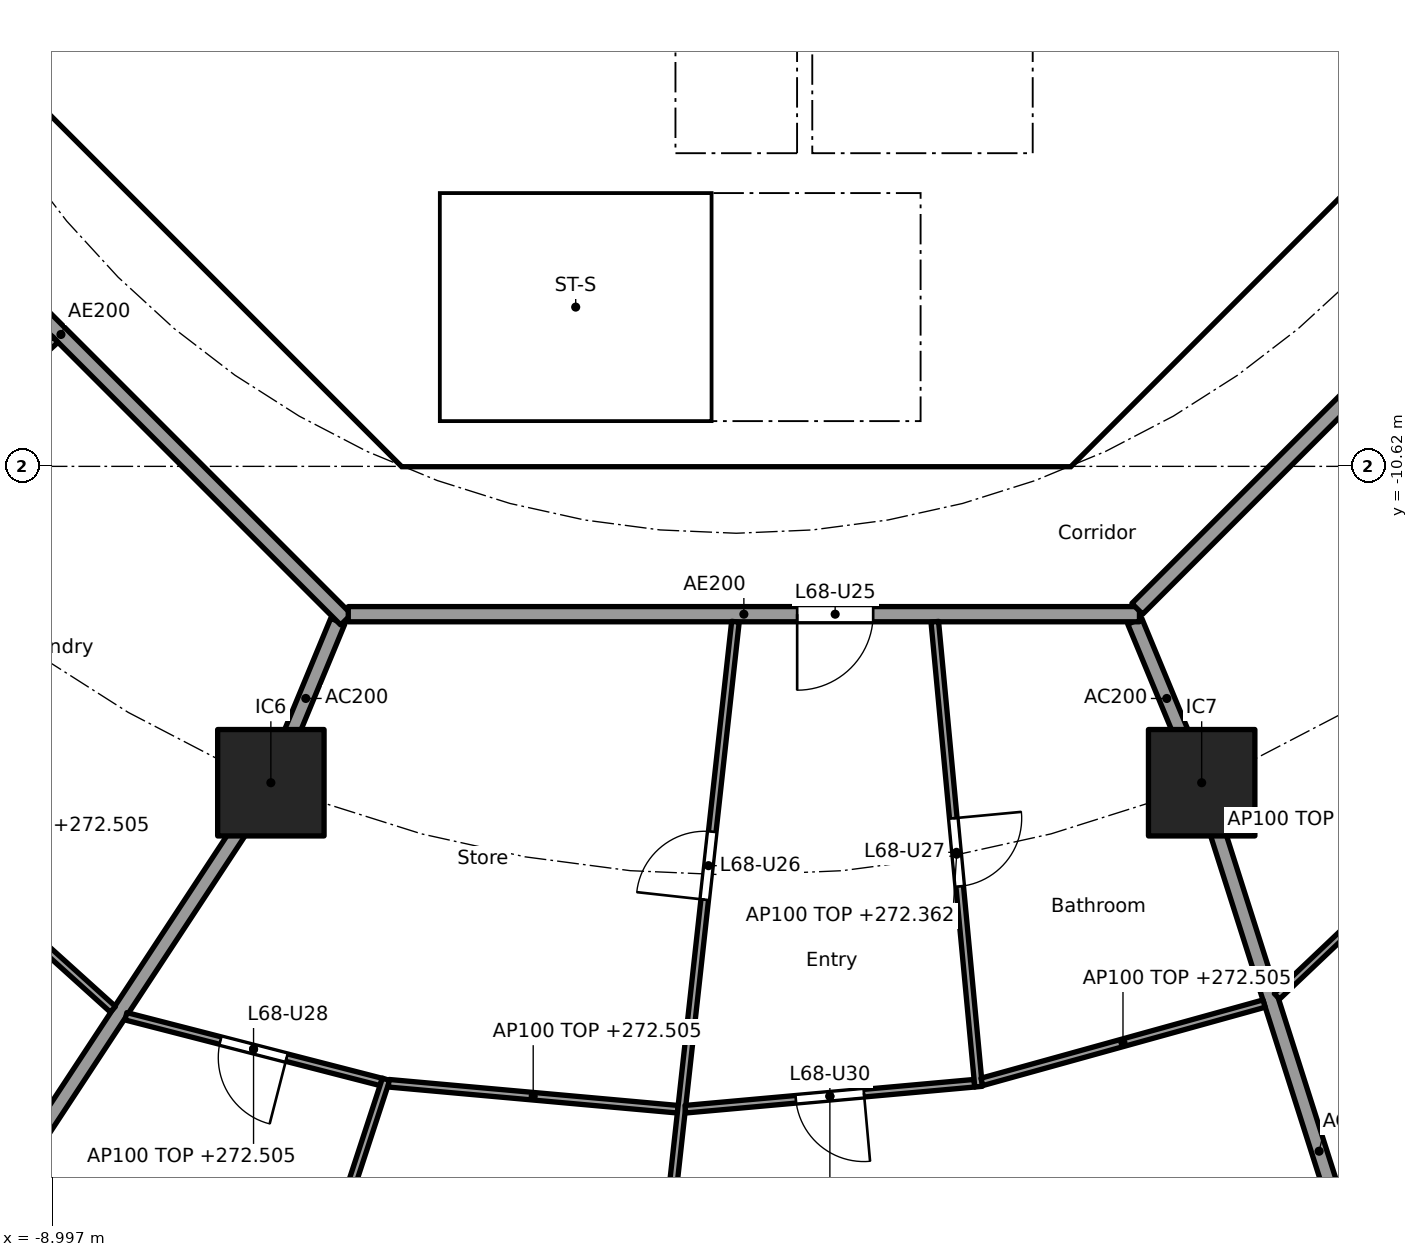
"""IFC4 building model, lengths in metres.
Left out: names, types, materials, properties, quantities, classifications, styles, units other than length and angle.
Written with IfcOpenShell. Run it as: python <this file> out.ifc"""

import sys

from ifc_helpers import new_model, si_unit, direction, frame, frame_2d, origin, origin_2d, place, context, subcontext, project, spatial, polyline, rectangle, outline, extrude, element, fill, save


model = new_model("IFC4")
c1 = context("Model", 3, precision=1e-05, world=origin(), true_north=direction((0.0, 1.0)))
c2 = subcontext(c1, "Body", "Model", "MODEL_VIEW")
j1 = project(units=[si_unit("LENGTHUNIT", "METRE"), si_unit("PLANEANGLEUNIT", "RADIAN")], contexts=[c1])
p1 = place(None, origin())
s1 = spatial("IfcSite", under=j1, at=p1, CompositionType="ELEMENT")
p2 = place(p1, origin())
s2 = spatial("IfcBuilding", under=s1, at=p2, CompositionType="ELEMENT")
p3 = place(p2, frame((0.0, 0.0, 269.6)))
s3 = spatial("IfcBuildingStorey", under=s2, at=p3, CompositionType="ELEMENT", Elevation=269.6)
for number, where, z_axis, x_axis in (
    (1, (-6.123, -14.782, 0.0), (0.0, 0.0, 1.0), (1.0, 0.0, 0.0)),
    (2, (6.123, -14.782, 0.0), (0.0, 0.0, 1.0), (1.0, 0.0, 0.0)),
):
    element("IfcColumn", number, at=place(p3, frame(where, z_axis=z_axis, x_axis=x_axis)), inside=s3, PredefinedType="COLUMN", context=c2, shape_type="SweptSolid", body=[
        extrude(rectangle(XDim=1.4, YDim=1.4, at=origin_2d()), origin(), (0.0, 0.0, 1.0), 3.7),
    ])
p4 = place(p3, frame((-9.988, -4.613, 0.0), z_axis=(0.0, 0.0, 1.0), x_axis=(0.707106781187, -0.707106781187, 0.0)))
e3 = element("IfcWall", 3, at=p4, inside=s3, PredefinedType="SHEAR", context=c2, shape_type="SweptSolid", body=[
    extrude(rectangle(XDim=7.602, YDim=0.6, at=frame_2d((3.801, 0.0))), origin(), (0.0, 0.0, 1.0), 3.44),
])
p5 = place(p4, frame((6.151, 0.0, 0.0)))
e4 = element("IfcOpeningElement", 4, at=p5, cuts=e3, PredefinedType="OPENING", context=c2, shape_type="SweptSolid", body=[
    extrude(rectangle(XDim=1.1, YDim=2.1, at=frame_2d((0.55, 1.05))), frame((0.0, 0.31, 0.0), z_axis=(0.0, -1.0, 0.0), x_axis=(1.0, 0.0, 0.0)), (0.0, 0.0, 1.0), 0.62),
])
p6 = place(p3, frame((4.613, -9.988, 0.0), z_axis=(0.0, 0.0, 1.0), x_axis=(0.707106781187, 0.707106781187, 0.0)))
e5 = element("IfcWall", 5, at=p6, inside=s3, PredefinedType="SHEAR", context=c2, shape_type="SweptSolid", body=[
    extrude(rectangle(XDim=7.602, YDim=0.6, at=frame_2d((3.801, 0.0))), origin(), (0.0, 0.0, 1.0), 3.44),
])
p7 = place(p6, frame((3.201, 0.0, 0.0)))
e6 = element("IfcOpeningElement", 6, at=p7, cuts=e5, PredefinedType="OPENING", context=c2, shape_type="SweptSolid", body=[
    extrude(rectangle(XDim=1.2, YDim=2.1, at=frame_2d((0.6, 1.05))), frame((0.0, 0.31, 0.0), z_axis=(0.0, -1.0, 0.0), x_axis=(1.0, 0.0, 0.0)), (0.0, 0.0, 1.0), 0.62),
])
p8 = place(p3, frame((4.0, -10.025, 0.0), z_axis=(0.0, 0.0, 1.0), x_axis=(0.0, 1.0, 0.0)))
e7 = element("IfcWall", 7, at=p8, inside=s3, PredefinedType="SOLIDWALL", context=c2, shape_type="SweptSolid", body=[
    extrude(rectangle(XDim=3.0, YDim=0.2, at=frame_2d((1.5, 0.0))), origin(), (0.0, 0.0, 1.0), 3.44),
])
p9 = place(p8, frame((0.975, 0.0, 0.0)))
e8 = element("IfcOpeningElement", 8, at=p9, cuts=e7, PredefinedType="OPENING", context=c2, shape_type="SweptSolid", body=[
    extrude(rectangle(XDim=1.1, YDim=2.1, at=frame_2d((0.55, 1.05))), frame((0.0, 0.11, 0.0), z_axis=(0.0, -1.0, 0.0), x_axis=(1.0, 0.0, 0.0)), (0.0, 0.0, 1.0), 0.22),
])
p10 = place(p3, frame((-5.8, -8.227, 0.0), z_axis=(0.0, 0.0, 1.0), x_axis=(0.0, 1.0, 0.0)))
e9 = element("IfcWall", 9, at=p10, inside=s3, PredefinedType="PARTITIONING", context=c2, shape_type="SweptSolid", body=[
    extrude(rectangle(XDim=3.927, YDim=0.15, at=frame_2d((1.963, 0.0))), origin(), (0.0, 0.0, 1.0), 3.44),
])
p11 = place(p10, frame((2.615, 0.0, 0.0)))
e10 = element("IfcOpeningElement", 10, at=p11, cuts=e9, PredefinedType="OPENING", context=c2, shape_type="SweptSolid", body=[
    extrude(rectangle(XDim=0.9, YDim=2.1, at=frame_2d((0.45, 1.05))), frame((0.0, 0.085, 0.0), z_axis=(0.0, -1.0, 0.0), x_axis=(1.0, 0.0, 0.0)), (0.0, 0.0, 1.0), 0.17),
])
p12 = place(p10, frame((0.539, 0.0, 0.0)))
e11 = element("IfcOpeningElement", 11, at=p12, cuts=e9, PredefinedType="OPENING", context=c2, shape_type="SweptSolid", body=[
    extrude(rectangle(XDim=0.9, YDim=2.1, at=frame_2d((0.45, 1.05))), frame((0.0, 0.085, 0.0), z_axis=(0.0, -1.0, 0.0), x_axis=(1.0, 0.0, 0.0)), (0.0, 0.0, 1.0), 0.17),
])
p13 = place(p3, frame((4.0, -6.5, 0.0), z_axis=(0.0, 0.0, 1.0), x_axis=(0.0, 1.0, 0.0)))
e12 = element("IfcWall", 12, at=p13, inside=s3, PredefinedType="SOLIDWALL", context=c2, shape_type="SweptSolid", body=[
    extrude(rectangle(XDim=2.2, YDim=0.2, at=frame_2d((1.1, 0.0))), origin(), (0.0, 0.0, 1.0), 3.44),
])
p14 = place(p13, frame((0.55, 0.0, 0.0)))
e13 = element("IfcOpeningElement", 13, at=p14, cuts=e12, PredefinedType="OPENING", context=c2, shape_type="SweptSolid", body=[
    extrude(rectangle(XDim=1.1, YDim=2.1, at=frame_2d((0.55, 1.05))), frame((0.0, 0.11, 0.0), z_axis=(0.0, -1.0, 0.0), x_axis=(1.0, 0.0, 0.0)), (0.0, 0.0, 1.0), 0.22),
])
p15 = place(p3, frame((-4.0, -6.5, 0.0), z_axis=(0.0, 0.0, 1.0), x_axis=(0.0, 1.0, 0.0)))
e14 = element("IfcWall", 14, at=p15, inside=s3, PredefinedType="SOLIDWALL", context=c2, shape_type="SweptSolid", body=[
    extrude(rectangle(XDim=2.2, YDim=0.2, at=frame_2d((1.1, 0.0))), origin(), (0.0, 0.0, 1.0), 3.44),
])
p16 = place(p15, frame((0.65, 0.0, 0.0)))
e15 = element("IfcOpeningElement", 15, at=p16, cuts=e14, PredefinedType="OPENING", context=c2, shape_type="SweptSolid", body=[
    extrude(rectangle(XDim=0.9, YDim=2.1, at=frame_2d((0.45, 1.05))), frame((0.0, 0.11, 0.0), z_axis=(0.0, -1.0, 0.0), x_axis=(1.0, 0.0, 0.0)), (0.0, 0.0, 1.0), 0.22),
])
p17 = place(p3, origin())
e16 = element("IfcWall", 16, at=p17, inside=s3, PredefinedType="SHEAR", context=c2, shape_type="SweptSolid", body=[
    extrude(outline(polyline([(-4.152, -10.025), (4.152, -10.025), (4.401, -9.776), (4.825, -10.2), (4.401, -10.625), (-4.401, -10.625), (-4.825, -10.2), (-4.401, -9.776), (-4.152, -10.025)])), origin(), (0.0, 0.0, 1.0), 3.44),
])
p18 = place(p3, frame((-8.001, -6.1, 0.0), z_axis=(0.0, 0.0, 1.0), x_axis=(1.0, 0.0, 0.0)))
e17 = element("IfcWall", 17, at=p18, inside=s3, PredefinedType="PARTITIONING", context=c2, shape_type="SweptSolid", body=[
    extrude(rectangle(XDim=2.126, YDim=0.15, at=frame_2d((1.063, 0.0))), origin(), (0.0, 0.0, 1.0), 3.44),
])
for number, where, z_axis, x_axis in (
    (18, (-0.9, -6.5, 0.0), (0.0, 0.0, 1.0), (0.0, 1.0, 0.0)),
    (19, (0.9, -6.5, 0.0), (0.0, 0.0, 1.0), (0.0, 1.0, 0.0)),
):
    element("IfcWall", number, at=place(p3, frame(where, z_axis=z_axis, x_axis=x_axis)), inside=s3, PredefinedType="SOLIDWALL", context=c2, shape_type="SweptSolid", body=[
        extrude(rectangle(XDim=2.2, YDim=0.2, at=frame_2d((1.1, 0.0))), origin(), (0.0, 0.0, 1.0), 3.44),
    ])
p19 = place(p3, origin())
e20 = element("IfcWall", 20, at=p19, inside=s3, PredefinedType="SOLIDWALL", context=c2, shape_type="SweptSolid", body=[
    extrude(outline(polyline([(-3.9, -10.025), (-4.1, -10.025), (-4.1, -7.025), (-3.9, -7.025), (-3.9, -10.025)])), origin(), (0.0, 0.0, 1.0), 3.44),
])
p20 = place(p3, origin())
e21 = element("IfcWall", 21, at=p20, inside=s3, PredefinedType="SOLIDWALL", context=c2, shape_type="SweptSolid", body=[
    extrude(outline(polyline([(4.1, -7.025), (-4.1, -7.025), (-4.1, -6.5), (4.1, -6.5), (4.1, -7.025)])), origin(), (0.0, 0.0, 1.0), 3.44),
])
p21 = place(p3, frame((-5.243, -12.657, 0.0), z_axis=(0.0, 0.0, 1.0), x_axis=(-0.382770106157, -0.923843626288, 0.0)))
e22 = element("IfcWall", 22, at=p21, inside=s3, PredefinedType="PARTITIONING", context=c2, shape_type="SweptSolid", body=[
    extrude(rectangle(XDim=2.199, YDim=0.2, at=frame_2d((1.1, 0.0))), origin(), (0.0, 0.0, 1.0), 3.44),
])
p22 = place(p3, frame((-6.151, -14.824, 0.0), z_axis=(0.0, 0.0, 1.0), x_axis=(-0.549345577828, -0.835595258556, 0.0)))
e23 = element("IfcWall", 23, at=p22, inside=s3, PredefinedType="PARTITIONING", context=c2, shape_type="SweptSolid", body=[
    extrude(rectangle(XDim=11.62, YDim=0.2, at=frame_2d((5.81, 0.0))), origin(), (0.0, 0.0, 1.0), 2.905),
])
p23 = place(p3, frame((5.243, -12.657, 0.0), z_axis=(0.0, 0.0, 1.0), x_axis=(0.382707856524, -0.923869415315, 0.0)))
e24 = element("IfcWall", 24, at=p23, inside=s3, PredefinedType="PARTITIONING", context=c2, shape_type="SweptSolid", body=[
    extrude(rectangle(XDim=2.2, YDim=0.2, at=frame_2d((1.1, 0.0))), origin(), (0.0, 0.0, 1.0), 3.44),
])
p24 = place(p3, frame((6.138, -14.83, 0.0), z_axis=(0.0, 0.0, 1.0), x_axis=(0.303653679037, -0.952782474234, 0.0)))
e25 = element("IfcWall", 25, at=p24, inside=s3, PredefinedType="PARTITIONING", context=c2, shape_type="SweptSolid", body=[
    extrude(rectangle(XDim=10.076, YDim=0.2, at=frame_2d((5.038, 0.0))), origin(), (0.0, 0.0, 1.0), 2.905),
])
p25 = place(p3, frame((-12.635, -5.134, 0.0), z_axis=(0.0, 0.0, 1.0), x_axis=(0.707106781187, -0.707106781187, 0.0)))
e26 = element("IfcWall", 26, at=p25, inside=s3, PredefinedType="PARTITIONING", context=c2, shape_type="SweptSolid", body=[
    extrude(rectangle(XDim=10.609, YDim=0.2, at=frame_2d((5.305, 0.0))), origin(), (0.0, 0.0, 1.0), 3.44),
])
p26 = place(p3, frame((-5.104, -12.565, 0.0), z_axis=(0.0, 0.0, 1.0), x_axis=(1.0, 0.0, 0.0)))
e27 = element("IfcWall", 27, at=p26, inside=s3, PredefinedType="PARTITIONING", context=c2, shape_type="SweptSolid", body=[
    extrude(rectangle(XDim=10.409, YDim=0.2, at=frame_2d((5.205, 0.0))), origin(), (0.0, 0.0, 1.0), 3.44),
])
p27 = place(p26, frame((5.906, 0.0, 0.0)))
e28 = element("IfcOpeningElement", 28, at=p27, cuts=e27, PredefinedType="OPENING", context=c2, shape_type="SweptSolid", body=[
    extrude(rectangle(XDim=1.0, YDim=2.1, at=frame_2d((0.5, 1.05))), frame((0.0, 0.11, 0.0), z_axis=(0.0, -1.0, 0.0), x_axis=(1.0, 0.0, 0.0)), (0.0, 0.0, 1.0), 0.22),
])
p28 = place(p3, frame((5.275, -12.494, 0.0), z_axis=(0.0, 0.0, 1.0), x_axis=(0.707106781187, 0.707106781187, 0.0)))
e29 = element("IfcWall", 29, at=p28, inside=s3, PredefinedType="PARTITIONING", context=c2, shape_type="SweptSolid", body=[
    extrude(rectangle(XDim=10.409, YDim=0.2, at=frame_2d((5.205, 0.0))), origin(), (0.0, 0.0, 1.0), 3.44),
])
p29 = place(p3, frame((-8.958, -8.952, 0.0), z_axis=(0.0, 0.0, 1.0), x_axis=(-0.73876526954, -0.673962815385, 0.0)))
e30 = element("IfcWall", 30, at=p29, inside=s3, PredefinedType="PARTITIONING", context=c2, shape_type="SweptSolid", body=[
    extrude(rectangle(XDim=5.647, YDim=0.1, at=frame_2d((2.824, 0.0))), origin(), (0.0, 0.0, 1.0), 2.762),
])
p30 = place(p3, frame((-11.676, -14.628, 0.0), z_axis=(0.0, 0.0, 1.0), x_axis=(0.74245829867, -0.669892285921, 0.0)))
e31 = element("IfcWall", 31, at=p30, inside=s3, PredefinedType="PARTITIONING", context=c2, shape_type="SweptSolid", body=[
    extrude(rectangle(XDim=4.68, YDim=0.1, at=frame_2d((2.34, 0.0))), origin(), (0.0, 0.0, 1.0), 2.905),
])
p31 = place(p3, frame((-8.03, -17.854, 0.0), z_axis=(0.0, 0.0, 1.0), x_axis=(0.968441967324, -0.249239154077, 0.0)))
e32 = element("IfcWall", 32, at=p31, inside=s3, PredefinedType="PARTITIONING", context=c2, shape_type="SweptSolid", body=[
    extrude(rectangle(XDim=3.468, YDim=0.1, at=frame_2d((1.734, 0.0))), origin(), (0.0, 0.0, 1.0), 2.905),
])
p32 = place(p31, frame((1.284, 0.0, 0.0)))
e33 = element("IfcOpeningElement", 33, at=p32, cuts=e32, PredefinedType="OPENING", context=c2, shape_type="SweptSolid", body=[
    extrude(rectangle(XDim=0.9, YDim=2.1, at=frame_2d((0.45, 1.05))), frame((0.0, 0.06, 0.0), z_axis=(0.0, -1.0, 0.0), x_axis=(1.0, 0.0, 0.0)), (0.0, 0.0, 1.0), 0.12),
])
p33 = place(p3, frame((-4.608, -18.684, 0.0), z_axis=(0.0, 0.0, 1.0), x_axis=(-0.311419102378, -0.95027266754, 0.0)))
e34 = element("IfcWall", 34, at=p33, inside=s3, PredefinedType="PARTITIONING", context=c2, shape_type="SweptSolid", body=[
    extrude(rectangle(XDim=8.735, YDim=0.1, at=frame_2d((4.367, 0.0))), origin(), (0.0, 0.0, 1.0), 2.905),
])
p34 = place(p33, frame((3.942, 0.0, 0.0)))
e35 = element("IfcOpeningElement", 35, at=p34, cuts=e34, PredefinedType="OPENING", context=c2, shape_type="SweptSolid", body=[
    extrude(rectangle(XDim=0.9, YDim=2.1, at=frame_2d((0.45, 1.05))), frame((0.0, 0.06, 0.0), z_axis=(0.0, -1.0, 0.0), x_axis=(1.0, 0.0, 0.0)), (0.0, 0.0, 1.0), 0.12),
])
p35 = place(p3, frame((-4.573, -18.736, 0.0), z_axis=(0.0, 0.0, 1.0), x_axis=(0.995986472869, -0.089503887414, 0.0)))
e36 = element("IfcWall", 36, at=p35, inside=s3, PredefinedType="PARTITIONING", context=c2, shape_type="SweptSolid", body=[
    extrude(rectangle(XDim=3.819, YDim=0.1, at=frame_2d((1.909, 0.0))), origin(), (0.0, 0.0, 1.0), 2.905),
])
p36 = place(p3, frame((-0.011, -12.664, 0.0), z_axis=(0.0, 0.0, 1.0), x_axis=(-0.109805889692, -0.993953050495, 0.0)))
e37 = element("IfcWall", 37, at=p36, inside=s3, PredefinedType="PARTITIONING", context=c2, shape_type="SweptSolid", body=[
    extrude(rectangle(XDim=15.248, YDim=0.1, at=frame_2d((7.624, 0.0))), origin(), (0.0, 0.0, 1.0), 2.762),
])
p37 = place(p36, frame((2.778, 0.0, 0.0)))
e38 = element("IfcOpeningElement", 38, at=p37, cuts=e37, PredefinedType="OPENING", context=c2, shape_type="SweptSolid", body=[
    extrude(rectangle(XDim=0.9, YDim=2.1, at=frame_2d((0.45, 1.05))), frame((0.0, 0.06, 0.0), z_axis=(0.0, -1.0, 0.0), x_axis=(1.0, 0.0, 0.0)), (0.0, 0.0, 1.0), 0.12),
])
p38 = place(p3, frame((-0.67, -19.077, 0.0), z_axis=(0.0, 0.0, 1.0), x_axis=(0.995986472869, 0.089503887414, 0.0)))
e39 = element("IfcWall", 39, at=p38, inside=s3, PredefinedType="PARTITIONING", context=c2, shape_type="SweptSolid", body=[
    extrude(rectangle(XDim=3.819, YDim=0.1, at=frame_2d((1.909, 0.0))), origin(), (0.0, 0.0, 1.0), 2.905),
])
p39 = place(p38, frame((1.459, 0.0, 0.0)))
e40 = element("IfcOpeningElement", 40, at=p39, cuts=e39, PredefinedType="OPENING", context=c2, shape_type="SweptSolid", body=[
    extrude(rectangle(XDim=0.9, YDim=2.1, at=frame_2d((0.45, 1.05))), frame((0.0, 0.06, 0.0), z_axis=(0.0, -1.0, 0.0), x_axis=(1.0, 0.0, 0.0)), (0.0, 0.0, 1.0), 0.12),
])
p40 = place(p3, frame((2.612, -12.664, 0.0), z_axis=(0.0, 0.0, 1.0), x_axis=(0.093781393779, -0.995592813444, 0.0)))
e41 = element("IfcWall", 41, at=p40, inside=s3, PredefinedType="PARTITIONING", context=c2, shape_type="SweptSolid", body=[
    extrude(rectangle(XDim=6.144, YDim=0.1, at=frame_2d((3.072, 0.0))), origin(), (0.0, 0.0, 1.0), 2.762),
])
p41 = place(p40, frame((2.597, 0.0, 0.0)))
e42 = element("IfcOpeningElement", 42, at=p41, cuts=e41, PredefinedType="OPENING", context=c2, shape_type="SweptSolid", body=[
    extrude(rectangle(XDim=0.9, YDim=2.1, at=frame_2d((0.45, 1.05))), frame((0.0, 0.06, 0.0), z_axis=(0.0, -1.0, 0.0), x_axis=(1.0, 0.0, 0.0)), (0.0, 0.0, 1.0), 0.12),
])
p42 = place(p3, frame((3.231, -18.718, 0.0), z_axis=(0.0, 0.0, 1.0), x_axis=(0.963606817151, 0.267323590318, 0.0)))
e43 = element("IfcWall", 43, at=p42, inside=s3, PredefinedType="PARTITIONING", context=c2, shape_type="SweptSolid", body=[
    extrude(rectangle(XDim=3.853, YDim=0.1, at=frame_2d((1.927, 0.0))), origin(), (0.0, 0.0, 1.0), 2.905),
])
p43 = place(p3, frame((7.113, -17.592, 0.0), z_axis=(0.0, 0.0, 1.0), x_axis=(0.725433932329, 0.688291805723, 0.0)))
e44 = element("IfcWall", 44, at=p43, inside=s3, PredefinedType="PARTITIONING", context=c2, shape_type="SweptSolid", body=[
    extrude(rectangle(XDim=4.305, YDim=0.1, at=frame_2d((2.153, 0.0))), origin(), (0.0, 0.0, 1.0), 2.905),
])
p44 = place(p14, origin())
e45 = element("IfcDoor", 45, at=p44, inside=s3, OperationType="DOUBLE_DOOR_SLIDING", PredefinedType="DOOR", context=c2, shape_type="SweptSolid", body=[
    extrude(rectangle(XDim=1.1, YDim=2.1, at=frame_2d((0.55, 1.05))), frame((0.0, 0.025, 0.0), z_axis=(0.0, -1.0, 0.0), x_axis=(1.0, 0.0, 0.0)), (0.0, 0.0, 1.0), 0.05),
])
fill(e13, e45)
p45 = place(p9, origin())
e46 = element("IfcDoor", 46, at=p45, inside=s3, OperationType="SINGLE_SWING_LEFT", PredefinedType="DOOR", context=c2, shape_type="SweptSolid", body=[
    extrude(rectangle(XDim=1.1, YDim=2.1, at=frame_2d((0.55, 1.05))), frame((0.0, 0.025, 0.0), z_axis=(0.0, -1.0, 0.0), x_axis=(1.0, 0.0, 0.0)), (0.0, 0.0, 1.0), 0.05),
])
fill(e8, e46)
p46 = place(p11, origin())
e47 = element("IfcDoor", 47, at=p46, inside=s3, OperationType="SINGLE_SWING_LEFT", PredefinedType="DOOR", context=c2, shape_type="SweptSolid", body=[
    extrude(rectangle(XDim=0.9, YDim=2.1, at=frame_2d((0.45, 1.05))), frame((0.0, 0.025, 0.0), z_axis=(0.0, -1.0, 0.0), x_axis=(1.0, 0.0, 0.0)), (0.0, 0.0, 1.0), 0.05),
])
fill(e10, e47)
p47 = place(p12, origin())
e48 = element("IfcDoor", 48, at=p47, inside=s3, OperationType="SINGLE_SWING_LEFT", PredefinedType="DOOR", context=c2, shape_type="SweptSolid", body=[
    extrude(rectangle(XDim=0.9, YDim=2.1, at=frame_2d((0.45, 1.05))), frame((0.0, 0.025, 0.0), z_axis=(0.0, -1.0, 0.0), x_axis=(1.0, 0.0, 0.0)), (0.0, 0.0, 1.0), 0.05),
])
fill(e11, e48)
p48 = place(p16, frame((0.9, 0.0, 0.0), x_axis=(-1.0, 0.0, 0.0)))
e49 = element("IfcDoor", 49, at=p48, inside=s3, OperationType="SINGLE_SWING_LEFT", PredefinedType="DOOR", context=c2, shape_type="SweptSolid", body=[
    extrude(rectangle(XDim=0.9, YDim=2.1, at=frame_2d((0.45, 1.05))), frame((0.0, 0.025, 0.0), z_axis=(0.0, -1.0, 0.0), x_axis=(1.0, 0.0, 0.0)), (0.0, 0.0, 1.0), 0.05),
])
fill(e15, e49)
p49 = place(p7, origin())
e50 = element("IfcDoor", 50, at=p49, inside=s3, OperationType="SINGLE_SWING_RIGHT", PredefinedType="DOOR", context=c2, shape_type="SweptSolid", body=[
    extrude(rectangle(XDim=1.2, YDim=2.1, at=frame_2d((0.6, 1.05))), frame((0.0, 0.025, 0.0), z_axis=(0.0, -1.0, 0.0), x_axis=(1.0, 0.0, 0.0)), (0.0, 0.0, 1.0), 0.05),
])
fill(e6, e50)
p50 = place(p5, origin())
e51 = element("IfcDoor", 51, at=p50, inside=s3, OperationType="SINGLE_SWING_RIGHT", PredefinedType="DOOR", context=c2, shape_type="SweptSolid", body=[
    extrude(rectangle(XDim=1.1, YDim=2.1, at=frame_2d((0.55, 1.05))), frame((0.0, 0.025, 0.0), z_axis=(0.0, -1.0, 0.0), x_axis=(1.0, 0.0, 0.0)), (0.0, 0.0, 1.0), 0.05),
])
fill(e4, e51)
p51 = place(p27, frame((1.0, 0.0, 0.0), x_axis=(-1.0, 0.0, 0.0)))
e52 = element("IfcDoor", 52, at=p51, inside=s3, OperationType="SINGLE_SWING_RIGHT", PredefinedType="DOOR", context=c2, shape_type="SweptSolid", body=[
    extrude(rectangle(XDim=1.0, YDim=2.1, at=frame_2d((0.5, 1.05))), frame((0.0, 0.025, 0.0), z_axis=(0.0, -1.0, 0.0), x_axis=(1.0, 0.0, 0.0)), (0.0, 0.0, 1.0), 0.05),
])
fill(e28, e52)
p52 = place(p37, frame((0.9, 0.0, 0.0), x_axis=(-1.0, 0.0, 0.0)))
e53 = element("IfcDoor", 53, at=p52, inside=s3, OperationType="SINGLE_SWING_LEFT", PredefinedType="DOOR", context=c2, shape_type="SweptSolid", body=[
    extrude(rectangle(XDim=0.9, YDim=2.1, at=frame_2d((0.45, 1.05))), frame((0.0, 0.025, 0.0), z_axis=(0.0, -1.0, 0.0), x_axis=(1.0, 0.0, 0.0)), (0.0, 0.0, 1.0), 0.05),
])
fill(e38, e53)
p53 = place(p41, origin())
e54 = element("IfcDoor", 54, at=p53, inside=s3, OperationType="SINGLE_SWING_LEFT", PredefinedType="DOOR", context=c2, shape_type="SweptSolid", body=[
    extrude(rectangle(XDim=0.9, YDim=2.1, at=frame_2d((0.45, 1.05))), frame((0.0, 0.025, 0.0), z_axis=(0.0, -1.0, 0.0), x_axis=(1.0, 0.0, 0.0)), (0.0, 0.0, 1.0), 0.05),
])
fill(e42, e54)
p54 = place(p32, frame((0.9, 0.0, 0.0), x_axis=(-1.0, 0.0, 0.0)))
e55 = element("IfcDoor", 55, at=p54, inside=s3, OperationType="SINGLE_SWING_LEFT", PredefinedType="DOOR", context=c2, shape_type="SweptSolid", body=[
    extrude(rectangle(XDim=0.9, YDim=2.1, at=frame_2d((0.45, 1.05))), frame((0.0, 0.025, 0.0), z_axis=(0.0, -1.0, 0.0), x_axis=(1.0, 0.0, 0.0)), (0.0, 0.0, 1.0), 0.05),
])
fill(e33, e55)
p55 = place(p39, frame((0.9, 0.0, 0.0), x_axis=(-1.0, 0.0, 0.0)))
e56 = element("IfcDoor", 56, at=p55, inside=s3, OperationType="SINGLE_SWING_LEFT", PredefinedType="DOOR", context=c2, shape_type="SweptSolid", body=[
    extrude(rectangle(XDim=0.9, YDim=2.1, at=frame_2d((0.45, 1.05))), frame((0.0, 0.025, 0.0), z_axis=(0.0, -1.0, 0.0), x_axis=(1.0, 0.0, 0.0)), (0.0, 0.0, 1.0), 0.05),
])
fill(e40, e56)
save(model, sys.argv[1])
